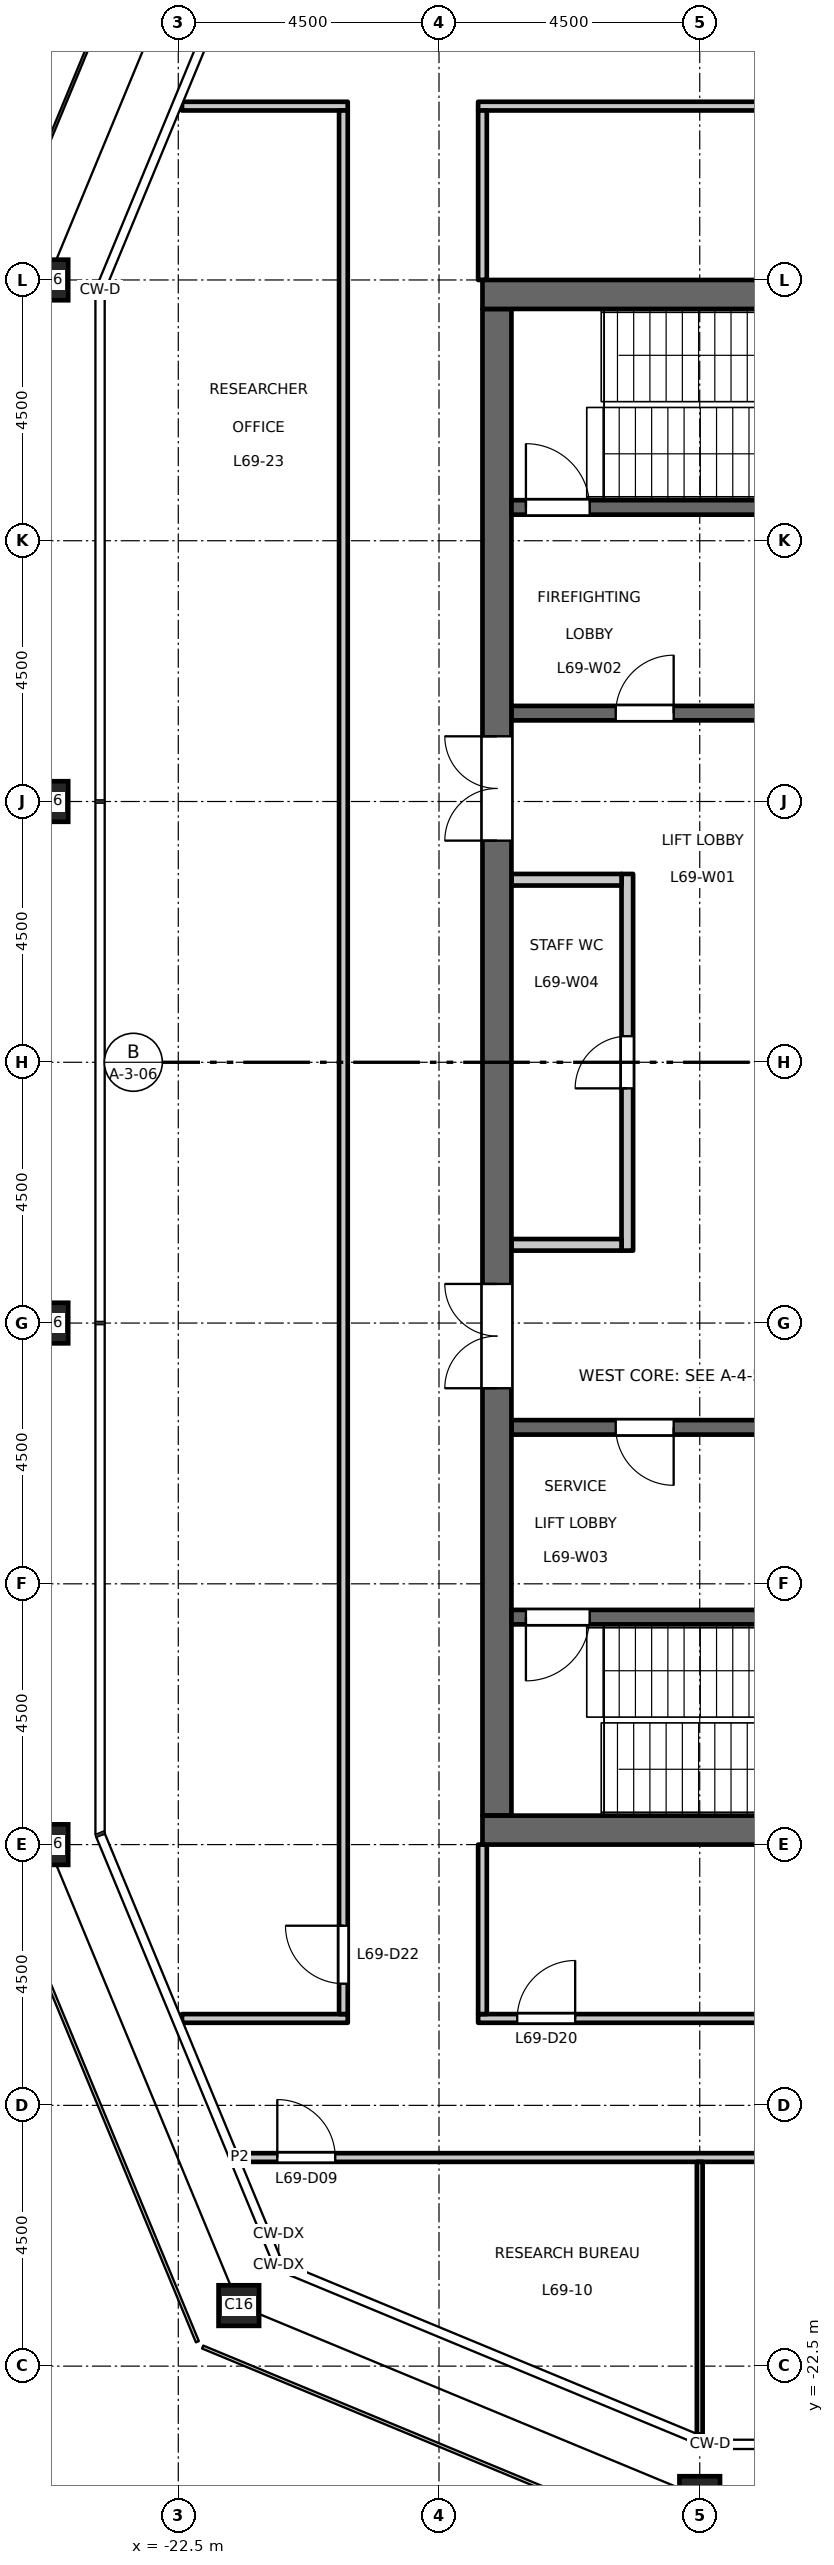
"""IFC4 building model, lengths in metres.
Left out: names, types, materials, properties, quantities, classifications, styles, units other than length and angle.
Written with IfcOpenShell. Run it as: python <this file> out.ifc"""

import sys

from ifc_helpers import new_model, si_unit, direction, frame, frame_2d, origin, origin_2d, place, context, subcontext, project, spatial, rectangle, hollow_rectangle, extrude, element, fill, save


model = new_model("IFC4")
c1 = context("Model", 3, precision=1e-05, world=origin(), true_north=direction((0.0, 1.0)))
c2 = subcontext(c1, "Body", "Model", "MODEL_VIEW")
j1 = project(units=[si_unit("LENGTHUNIT", "METRE"), si_unit("PLANEANGLEUNIT", "RADIAN")], contexts=[c1])
p1 = place(None, origin())
s1 = spatial("IfcSite", under=j1, at=p1, CompositionType="ELEMENT")
p2 = place(p1, origin())
s2 = spatial("IfcBuilding", under=s1, at=p2, CompositionType="ELEMENT")
p3 = place(p2, frame((0.0, 0.0, 321.2)))
s3 = spatial("IfcBuildingStorey", under=s2, at=p3, CompositionType="ELEMENT", Elevation=321.2)
for number, where, z_axis, x_axis in (
    (1, (-13.5, -24.75, 0.0), (0.0, 0.0, 1.0), (1.0, 0.0, 0.0)),
    (2, (-24.75, 13.5, 0.0), (0.0, 0.0, 1.0), (1.0, 0.0, 0.0)),
    (3, (-24.75, 4.5, 0.0), (0.0, 0.0, 1.0), (1.0, 0.0, 0.0)),
    (4, (-24.75, -4.5, 0.0), (0.0, 0.0, 1.0), (1.0, 0.0, 0.0)),
    (5, (-24.75, -13.5, 0.0), (0.0, 0.0, 1.0), (1.0, 0.0, 0.0)),
    (6, (-21.455, -21.455, 0.0), (0.0, 0.0, 1.0), (1.0, 0.0, 0.0)),
):
    element("IfcColumn", number, at=place(p3, frame(where, z_axis=z_axis, x_axis=x_axis)), inside=s3, PredefinedType="COLUMN", context=c2, shape_type="SweptSolid", body=[
        extrude(hollow_rectangle(XDim=0.7, YDim=0.7, WallThickness=0.036, at=origin_2d()), origin(), (0.0, 0.0, 1.0), 4.5),
    ])
p4 = place(p3, frame((-14.75, -3.25, 0.0), z_axis=(0.0, 0.0, 1.0), x_axis=(0.0, 1.0, 0.0)))
e7 = element("IfcWall", 7, at=p4, inside=s3, PredefinedType="PARTITIONING", context=c2, shape_type="SweptSolid", body=[
    extrude(rectangle(XDim=6.5, YDim=0.2, at=frame_2d((3.25, 0.0))), origin(), (0.0, 0.0, 1.0), 4.35),
])
p5 = place(p4, frame((2.8, 0.0, 0.0)))
e8 = element("IfcOpeningElement", 8, at=p5, cuts=e7, PredefinedType="OPENING", context=c2, shape_type="SweptSolid", body=[
    extrude(rectangle(XDim=0.9, YDim=2.1, at=frame_2d((0.45, 1.05))), frame((0.0, 0.11, 0.0), z_axis=(0.0, -1.0, 0.0), x_axis=(1.0, 0.0, 0.0)), (0.0, 0.0, 1.0), 0.22),
])
for number, where, z_axis, x_axis in (
    (9, (-14.85, 3.15, 0.0), (0.0, 0.0, 1.0), (-1.0, 0.0, 0.0)),
    (10, (-14.85, -3.15, 0.0), (0.0, 0.0, 1.0), (-1.0, 0.0, 0.0)),
):
    element("IfcWall", number, at=place(p3, frame(where, z_axis=z_axis, x_axis=x_axis)), inside=s3, PredefinedType="PARTITIONING", context=c2, shape_type="SweptSolid", body=[
        extrude(rectangle(XDim=1.9, YDim=0.2, at=frame_2d((0.95, 0.0))), origin(), (0.0, 0.0, 1.0), 4.35),
    ])
p6 = place(p3, frame((-12.15, 6.025, 0.0), z_axis=(0.0, 0.0, 1.0), x_axis=(-1.0, 0.0, 0.0)))
e11 = element("IfcWall", 11, at=p6, inside=s3, PredefinedType="SHEAR", context=c2, shape_type="SweptSolid", body=[
    extrude(rectangle(XDim=4.6, YDim=0.25, at=frame_2d((2.3, 0.0))), origin(), (0.0, 0.0, 1.0), 4.35),
])
p7 = place(p6, frame((1.8, 0.0, 0.0)))
e12 = element("IfcOpeningElement", 12, at=p7, cuts=e11, PredefinedType="OPENING", context=c2, shape_type="SweptSolid", body=[
    extrude(rectangle(XDim=1.0, YDim=2.1, at=frame_2d((0.5, 1.05))), frame((0.0, 0.135, 0.0), z_axis=(0.0, -1.0, 0.0), x_axis=(1.0, 0.0, 0.0)), (0.0, 0.0, 1.0), 0.27),
])
p8 = place(p3, frame((-12.15, -6.3, 0.0), z_axis=(0.0, 0.0, 1.0), x_axis=(-1.0, 0.0, 0.0)))
e13 = element("IfcWall", 13, at=p8, inside=s3, PredefinedType="SHEAR", context=c2, shape_type="SweptSolid", body=[
    extrude(rectangle(XDim=4.6, YDim=0.25, at=frame_2d((2.3, 0.0))), origin(), (0.0, 0.0, 1.0), 4.35),
])
p9 = place(p8, frame((1.8, 0.0, 0.0)))
e14 = element("IfcOpeningElement", 14, at=p9, cuts=e13, PredefinedType="OPENING", context=c2, shape_type="SweptSolid", body=[
    extrude(rectangle(XDim=1.0, YDim=2.1, at=frame_2d((0.5, 1.05))), frame((0.0, 0.135, 0.0), z_axis=(0.0, -1.0, 0.0), x_axis=(1.0, 0.0, 0.0)), (0.0, 0.0, 1.0), 0.27),
])
p10 = place(p3, frame((-17.0, -13.0, 0.0), z_axis=(0.0, 0.0, 1.0), x_axis=(0.0, 1.0, 0.0)))
e15 = element("IfcWall", 15, at=p10, inside=s3, PredefinedType="SHEAR", context=c2, shape_type="SweptSolid", body=[
    extrude(rectangle(XDim=26.0, YDim=0.5, at=frame_2d((13.0, 0.0))), origin(), (0.0, 0.0, 1.0), 4.35),
])
p11 = place(p10, frame((16.825, 0.0, 0.0)))
e16 = element("IfcOpeningElement", 16, at=p11, cuts=e15, PredefinedType="OPENING", context=c2, shape_type="SweptSolid", body=[
    extrude(rectangle(XDim=1.8, YDim=2.1, at=frame_2d((0.9, 1.05))), frame((0.0, 0.26, 0.0), z_axis=(0.0, -1.0, 0.0), x_axis=(1.0, 0.0, 0.0)), (0.0, 0.0, 1.0), 0.52),
])
p12 = place(p10, frame((7.375, 0.0, 0.0)))
e17 = element("IfcOpeningElement", 17, at=p12, cuts=e15, PredefinedType="OPENING", context=c2, shape_type="SweptSolid", body=[
    extrude(rectangle(XDim=1.8, YDim=2.1, at=frame_2d((0.9, 1.05))), frame((0.0, 0.26, 0.0), z_axis=(0.0, -1.0, 0.0), x_axis=(1.0, 0.0, 0.0)), (0.0, 0.0, 1.0), 0.52),
])
p13 = place(p3, frame((-8.75, 9.575, 0.0), z_axis=(0.0, 0.0, 1.0), x_axis=(-1.0, 0.0, 0.0)))
e18 = element("IfcWall", 18, at=p13, inside=s3, PredefinedType="SHEAR", context=c2, shape_type="SweptSolid", body=[
    extrude(rectangle(XDim=8.0, YDim=0.25, at=frame_2d((4.0, 0.0))), origin(), (0.0, 0.0, 1.0), 4.35),
])
p14 = place(p13, frame((6.65, 0.0, 0.0)))
e19 = element("IfcOpeningElement", 19, at=p14, cuts=e18, PredefinedType="OPENING", context=c2, shape_type="SweptSolid", body=[
    extrude(rectangle(XDim=1.1, YDim=2.1, at=frame_2d((0.55, 1.05))), frame((0.0, 0.135, 0.0), z_axis=(0.0, -1.0, 0.0), x_axis=(1.0, 0.0, 0.0)), (0.0, 0.0, 1.0), 0.27),
])
p15 = place(p3, frame((-8.75, -9.575, 0.0), z_axis=(0.0, 0.0, 1.0), x_axis=(-1.0, 0.0, 0.0)))
e20 = element("IfcWall", 20, at=p15, inside=s3, PredefinedType="SHEAR", context=c2, shape_type="SweptSolid", body=[
    extrude(rectangle(XDim=8.0, YDim=0.25, at=frame_2d((4.0, 0.0))), origin(), (0.0, 0.0, 1.0), 4.35),
])
p16 = place(p15, frame((6.65, 0.0, 0.0)))
e21 = element("IfcOpeningElement", 21, at=p16, cuts=e20, PredefinedType="OPENING", context=c2, shape_type="SweptSolid", body=[
    extrude(rectangle(XDim=1.1, YDim=2.1, at=frame_2d((0.55, 1.05))), frame((0.0, 0.135, 0.0), z_axis=(0.0, -1.0, 0.0), x_axis=(1.0, 0.0, 0.0)), (0.0, 0.0, 1.0), 0.27),
])
for number, where, z_axis, x_axis in (
    (22, (-8.25, 13.25, 0.0), (0.0, 0.0, 1.0), (-1.0, 0.0, 0.0)),
    (23, (-8.25, -13.25, 0.0), (0.0, 0.0, 1.0), (-1.0, 0.0, 0.0)),
):
    element("IfcWall", number, at=place(p3, frame(where, z_axis=z_axis, x_axis=x_axis)), inside=s3, PredefinedType="SHEAR", context=c2, shape_type="SweptSolid", body=[
        extrude(rectangle(XDim=9.0, YDim=0.5, at=frame_2d((4.5, 0.0))), origin(), (0.0, 0.0, 1.0), 4.35),
    ])
p17 = place(p3, frame((-21.441, -18.9, 0.0), z_axis=(0.0, 0.0, 1.0), x_axis=(1.0, 0.0, 0.0)))
e24 = element("IfcWall", 24, at=p17, inside=s3, PredefinedType="PARTITIONING", context=c2, shape_type="SweptSolid", body=[
    extrude(rectangle(XDim=42.882, YDim=0.15, at=frame_2d((21.441, 0.0))), origin(), (0.0, 0.0, 1.0), 4.35),
])
p18 = place(p17, frame((15.341, 0.0, 0.0)))
e25 = element("IfcOpeningElement", 25, at=p18, cuts=e24, PredefinedType="OPENING", context=c2, shape_type="SweptSolid", body=[
    extrude(rectangle(XDim=1.0, YDim=2.1, at=frame_2d((0.5, 1.05))), frame((0.0, 0.085, 0.0), z_axis=(0.0, -1.0, 0.0), x_axis=(1.0, 0.0, 0.0)), (0.0, 0.0, 1.0), 0.17),
])
p19 = place(p17, frame((17.591, 0.0, 0.0)))
e26 = element("IfcOpeningElement", 26, at=p19, cuts=e24, PredefinedType="OPENING", context=c2, shape_type="SweptSolid", body=[
    extrude(rectangle(XDim=1.0, YDim=2.1, at=frame_2d((0.5, 1.05))), frame((0.0, 0.085, 0.0), z_axis=(0.0, -1.0, 0.0), x_axis=(1.0, 0.0, 0.0)), (0.0, 0.0, 1.0), 0.17),
])
p20 = place(p17, frame((33.341, 0.0, 0.0)))
e27 = element("IfcOpeningElement", 27, at=p20, cuts=e24, PredefinedType="OPENING", context=c2, shape_type="SweptSolid", body=[
    extrude(rectangle(XDim=1.0, YDim=2.1, at=frame_2d((0.5, 1.05))), frame((0.0, 0.085, 0.0), z_axis=(0.0, -1.0, 0.0), x_axis=(1.0, 0.0, 0.0)), (0.0, 0.0, 1.0), 0.17),
])
p21 = place(p17, frame((0.65, 0.0, 0.0)))
e28 = element("IfcOpeningElement", 28, at=p21, cuts=e24, PredefinedType="OPENING", context=c2, shape_type="SweptSolid", body=[
    extrude(rectangle(XDim=1.0, YDim=2.1, at=frame_2d((0.5, 1.05))), frame((0.0, 0.085, 0.0), z_axis=(0.0, -1.0, 0.0), x_axis=(1.0, 0.0, 0.0)), (0.0, 0.0, 1.0), 0.17),
])
p22 = place(p17, frame((41.341, 0.0, 0.0)))
e29 = element("IfcOpeningElement", 29, at=p22, cuts=e24, PredefinedType="OPENING", context=c2, shape_type="SweptSolid", body=[
    extrude(rectangle(XDim=1.0, YDim=2.1, at=frame_2d((0.5, 1.05))), frame((0.0, 0.085, 0.0), z_axis=(0.0, -1.0, 0.0), x_axis=(1.0, 0.0, 0.0)), (0.0, 0.0, 1.0), 0.17),
])
p23 = place(p3, frame((-22.436, -16.5, 0.0), z_axis=(0.0, 0.0, 1.0), x_axis=(1.0, 0.0, 0.0)))
e30 = element("IfcWall", 30, at=p23, inside=s3, PredefinedType="PARTITIONING", context=c2, shape_type="SweptSolid", body=[
    extrude(rectangle(XDim=2.861, YDim=0.15, at=frame_2d((1.431, 0.0))), origin(), (0.0, 0.0, 1.0), 4.35),
])
p24 = place(p3, frame((-17.325, -16.5, 0.0), z_axis=(0.0, 0.0, 1.0), x_axis=(1.0, 0.0, 0.0)))
e31 = element("IfcWall", 31, at=p24, inside=s3, PredefinedType="PARTITIONING", context=c2, shape_type="SweptSolid", body=[
    extrude(rectangle(XDim=34.65, YDim=0.15, at=frame_2d((17.325, 0.0))), origin(), (0.0, 0.0, 1.0), 4.35),
])
p25 = place(p24, frame((9.675, 0.0, 0.0)))
e32 = element("IfcOpeningElement", 32, at=p25, cuts=e31, PredefinedType="OPENING", context=c2, shape_type="SweptSolid", body=[
    extrude(rectangle(XDim=1.0, YDim=2.1, at=frame_2d((0.5, 1.05))), frame((0.0, 0.085, 0.0), z_axis=(0.0, -1.0, 0.0), x_axis=(1.0, 0.0, 0.0)), (0.0, 0.0, 1.0), 0.17),
])
p26 = place(p24, frame((23.925, 0.0, 0.0)))
e33 = element("IfcOpeningElement", 33, at=p26, cuts=e31, PredefinedType="OPENING", context=c2, shape_type="SweptSolid", body=[
    extrude(rectangle(XDim=1.0, YDim=2.1, at=frame_2d((0.5, 1.05))), frame((0.0, 0.085, 0.0), z_axis=(0.0, -1.0, 0.0), x_axis=(1.0, 0.0, 0.0)), (0.0, 0.0, 1.0), 0.17),
])
p27 = place(p24, frame((0.675, 0.0, 0.0)))
e34 = element("IfcOpeningElement", 34, at=p27, cuts=e31, PredefinedType="OPENING", context=c2, shape_type="SweptSolid", body=[
    extrude(rectangle(XDim=1.0, YDim=2.1, at=frame_2d((0.5, 1.05))), frame((0.0, 0.085, 0.0), z_axis=(0.0, -1.0, 0.0), x_axis=(1.0, 0.0, 0.0)), (0.0, 0.0, 1.0), 0.17),
])
p28 = place(p24, frame((32.925, 0.0, 0.0)))
e35 = element("IfcOpeningElement", 35, at=p28, cuts=e31, PredefinedType="OPENING", context=c2, shape_type="SweptSolid", body=[
    extrude(rectangle(XDim=1.0, YDim=2.1, at=frame_2d((0.5, 1.05))), frame((0.0, 0.085, 0.0), z_axis=(0.0, -1.0, 0.0), x_axis=(1.0, 0.0, 0.0)), (0.0, 0.0, 1.0), 0.17),
])
p29 = place(p3, frame((-22.436, 16.5, 0.0), z_axis=(0.0, 0.0, 1.0), x_axis=(1.0, 0.0, 0.0)))
e36 = element("IfcWall", 36, at=p29, inside=s3, PredefinedType="PARTITIONING", context=c2, shape_type="SweptSolid", body=[
    extrude(rectangle(XDim=2.861, YDim=0.15, at=frame_2d((1.431, 0.0))), origin(), (0.0, 0.0, 1.0), 4.35),
])
p30 = place(p3, frame((-17.325, 16.5, 0.0), z_axis=(0.0, 0.0, 1.0), x_axis=(1.0, 0.0, 0.0)))
e37 = element("IfcWall", 37, at=p30, inside=s3, PredefinedType="PARTITIONING", context=c2, shape_type="SweptSolid", body=[
    extrude(rectangle(XDim=34.65, YDim=0.15, at=frame_2d((17.325, 0.0))), origin(), (0.0, 0.0, 1.0), 4.35),
])
p31 = place(p30, frame((9.725, 0.0, 0.0)))
e38 = element("IfcOpeningElement", 38, at=p31, cuts=e37, PredefinedType="OPENING", context=c2, shape_type="SweptSolid", body=[
    extrude(rectangle(XDim=1.0, YDim=2.1, at=frame_2d((0.5, 1.05))), frame((0.0, 0.085, 0.0), z_axis=(0.0, -1.0, 0.0), x_axis=(1.0, 0.0, 0.0)), (0.0, 0.0, 1.0), 0.17),
])
p32 = place(p30, frame((7.475, 0.0, 0.0)))
e39 = element("IfcOpeningElement", 39, at=p32, cuts=e37, PredefinedType="OPENING", context=c2, shape_type="SweptSolid", body=[
    extrude(rectangle(XDim=1.0, YDim=2.1, at=frame_2d((0.5, 1.05))), frame((0.0, 0.085, 0.0), z_axis=(0.0, -1.0, 0.0), x_axis=(1.0, 0.0, 0.0)), (0.0, 0.0, 1.0), 0.17),
])
p33 = place(p30, frame((26.225, 0.0, 0.0)))
e40 = element("IfcOpeningElement", 40, at=p33, cuts=e37, PredefinedType="OPENING", context=c2, shape_type="SweptSolid", body=[
    extrude(rectangle(XDim=1.0, YDim=2.1, at=frame_2d((0.5, 1.05))), frame((0.0, 0.085, 0.0), z_axis=(0.0, -1.0, 0.0), x_axis=(1.0, 0.0, 0.0)), (0.0, 0.0, 1.0), 0.17),
])
p34 = place(p3, frame((-19.65, -16.425, 0.0), z_axis=(0.0, 0.0, 1.0), x_axis=(0.0, 1.0, 0.0)))
e41 = element("IfcWall", 41, at=p34, inside=s3, PredefinedType="PARTITIONING", context=c2, shape_type="SweptSolid", body=[
    extrude(rectangle(XDim=32.85, YDim=0.15, at=frame_2d((16.425, 0.0))), origin(), (0.0, 0.0, 1.0), 4.35),
])
p35 = place(p34, frame((0.525, 0.0, 0.0)))
e42 = element("IfcOpeningElement", 42, at=p35, cuts=e41, PredefinedType="OPENING", context=c2, shape_type="SweptSolid", body=[
    extrude(rectangle(XDim=1.0, YDim=2.1, at=frame_2d((0.5, 1.05))), frame((0.0, 0.085, 0.0), z_axis=(0.0, -1.0, 0.0), x_axis=(1.0, 0.0, 0.0)), (0.0, 0.0, 1.0), 0.17),
])
for number, where, z_axis, x_axis in (
    (43, (-17.25, -16.425, 0.0), (0.0, 0.0, 1.0), (0.0, 1.0, 0.0)),
    (44, (-17.25, 13.5, 0.0), (0.0, 0.0, 1.0), (0.0, 1.0, 0.0)),
):
    element("IfcWall", number, at=place(p3, frame(where, z_axis=z_axis, x_axis=x_axis)), inside=s3, PredefinedType="PARTITIONING", context=c2, shape_type="SweptSolid", body=[
        extrude(rectangle(XDim=2.925, YDim=0.15, at=frame_2d((1.462, 0.0))), origin(), (0.0, 0.0, 1.0), 4.35),
    ])
p36 = place(p3, frame((-13.5, -23.678, 0.0), z_axis=(0.0, 0.0, 1.0), x_axis=(0.0, 1.0, 0.0)))
e45 = element("IfcWall", 45, at=p36, inside=s3, PredefinedType="PARTITIONING", context=c2, shape_type="SweptSolid", body=[
    extrude(rectangle(XDim=4.703, YDim=0.1, at=frame_2d((2.352, 0.0))), origin(), (0.0, 0.0, 1.0), 3.75),
])
p37 = place(p7, origin())
e46 = element("IfcDoor", 46, at=p37, inside=s3, OperationType="SINGLE_SWING_LEFT", PredefinedType="DOOR", context=c2, shape_type="SweptSolid", body=[
    extrude(rectangle(XDim=1.0, YDim=2.1, at=frame_2d((0.5, 1.05))), frame((0.0, 0.025, 0.0), z_axis=(0.0, -1.0, 0.0), x_axis=(1.0, 0.0, 0.0)), (0.0, 0.0, 1.0), 0.05),
])
fill(e12, e46)
p38 = place(p9, origin())
e47 = element("IfcDoor", 47, at=p38, inside=s3, OperationType="SINGLE_SWING_RIGHT", PredefinedType="DOOR", context=c2, shape_type="SweptSolid", body=[
    extrude(rectangle(XDim=1.0, YDim=2.1, at=frame_2d((0.5, 1.05))), frame((0.0, 0.025, 0.0), z_axis=(0.0, -1.0, 0.0), x_axis=(1.0, 0.0, 0.0)), (0.0, 0.0, 1.0), 0.05),
])
fill(e14, e47)
p39 = place(p14, origin())
e48 = element("IfcDoor", 48, at=p39, inside=s3, OperationType="SINGLE_SWING_RIGHT", PredefinedType="DOOR", context=c2, shape_type="SweptSolid", body=[
    extrude(rectangle(XDim=1.1, YDim=2.1, at=frame_2d((0.55, 1.05))), frame((0.0, 0.025, 0.0), z_axis=(0.0, -1.0, 0.0), x_axis=(1.0, 0.0, 0.0)), (0.0, 0.0, 1.0), 0.05),
])
fill(e19, e48)
p40 = place(p16, origin())
e49 = element("IfcDoor", 49, at=p40, inside=s3, OperationType="SINGLE_SWING_LEFT", PredefinedType="DOOR", context=c2, shape_type="SweptSolid", body=[
    extrude(rectangle(XDim=1.1, YDim=2.1, at=frame_2d((0.55, 1.05))), frame((0.0, 0.025, 0.0), z_axis=(0.0, -1.0, 0.0), x_axis=(1.0, 0.0, 0.0)), (0.0, 0.0, 1.0), 0.05),
])
fill(e21, e49)
p41 = place(p11, origin())
e50 = element("IfcDoor", 50, at=p41, inside=s3, OperationType="DOUBLE_DOOR_DOUBLE_SWING", PredefinedType="DOOR", context=c2, shape_type="SweptSolid", body=[
    extrude(rectangle(XDim=1.8, YDim=2.1, at=frame_2d((0.9, 1.05))), frame((0.0, 0.025, 0.0), z_axis=(0.0, -1.0, 0.0), x_axis=(1.0, 0.0, 0.0)), (0.0, 0.0, 1.0), 0.05),
])
fill(e16, e50)
p42 = place(p12, origin())
e51 = element("IfcDoor", 51, at=p42, inside=s3, OperationType="DOUBLE_DOOR_DOUBLE_SWING", PredefinedType="DOOR", context=c2, shape_type="SweptSolid", body=[
    extrude(rectangle(XDim=1.8, YDim=2.1, at=frame_2d((0.9, 1.05))), frame((0.0, 0.025, 0.0), z_axis=(0.0, -1.0, 0.0), x_axis=(1.0, 0.0, 0.0)), (0.0, 0.0, 1.0), 0.05),
])
fill(e17, e51)
p43 = place(p5, origin())
e52 = element("IfcDoor", 52, at=p43, inside=s3, OperationType="SINGLE_SWING_RIGHT", PredefinedType="DOOR", context=c2, shape_type="SweptSolid", body=[
    extrude(rectangle(XDim=0.9, YDim=2.1, at=frame_2d((0.45, 1.05))), frame((0.0, 0.025, 0.0), z_axis=(0.0, -1.0, 0.0), x_axis=(1.0, 0.0, 0.0)), (0.0, 0.0, 1.0), 0.05),
])
fill(e8, e52)
p44 = place(p21, origin())
e53 = element("IfcDoor", 53, at=p44, inside=s3, OperationType="SINGLE_SWING_LEFT", PredefinedType="DOOR", context=c2, shape_type="SweptSolid", body=[
    extrude(rectangle(XDim=1.0, YDim=2.1, at=frame_2d((0.5, 1.05))), frame((0.0, 0.025, 0.0), z_axis=(0.0, -1.0, 0.0), x_axis=(1.0, 0.0, 0.0)), (0.0, 0.0, 1.0), 0.05),
])
fill(e28, e53)
p45 = place(p27, origin())
e54 = element("IfcDoor", 54, at=p45, inside=s3, OperationType="SINGLE_SWING_RIGHT", PredefinedType="DOOR", context=c2, shape_type="SweptSolid", body=[
    extrude(rectangle(XDim=1.0, YDim=2.1, at=frame_2d((0.5, 1.05))), frame((0.0, 0.025, 0.0), z_axis=(0.0, -1.0, 0.0), x_axis=(1.0, 0.0, 0.0)), (0.0, 0.0, 1.0), 0.05),
])
fill(e34, e54)
p46 = place(p35, origin())
e55 = element("IfcDoor", 55, at=p46, inside=s3, OperationType="SINGLE_SWING_RIGHT", PredefinedType="DOOR", context=c2, shape_type="SweptSolid", body=[
    extrude(rectangle(XDim=1.0, YDim=2.1, at=frame_2d((0.5, 1.05))), frame((0.0, 0.025, 0.0), z_axis=(0.0, -1.0, 0.0), x_axis=(1.0, 0.0, 0.0)), (0.0, 0.0, 1.0), 0.05),
])
fill(e42, e55)
save(model, sys.argv[1])
